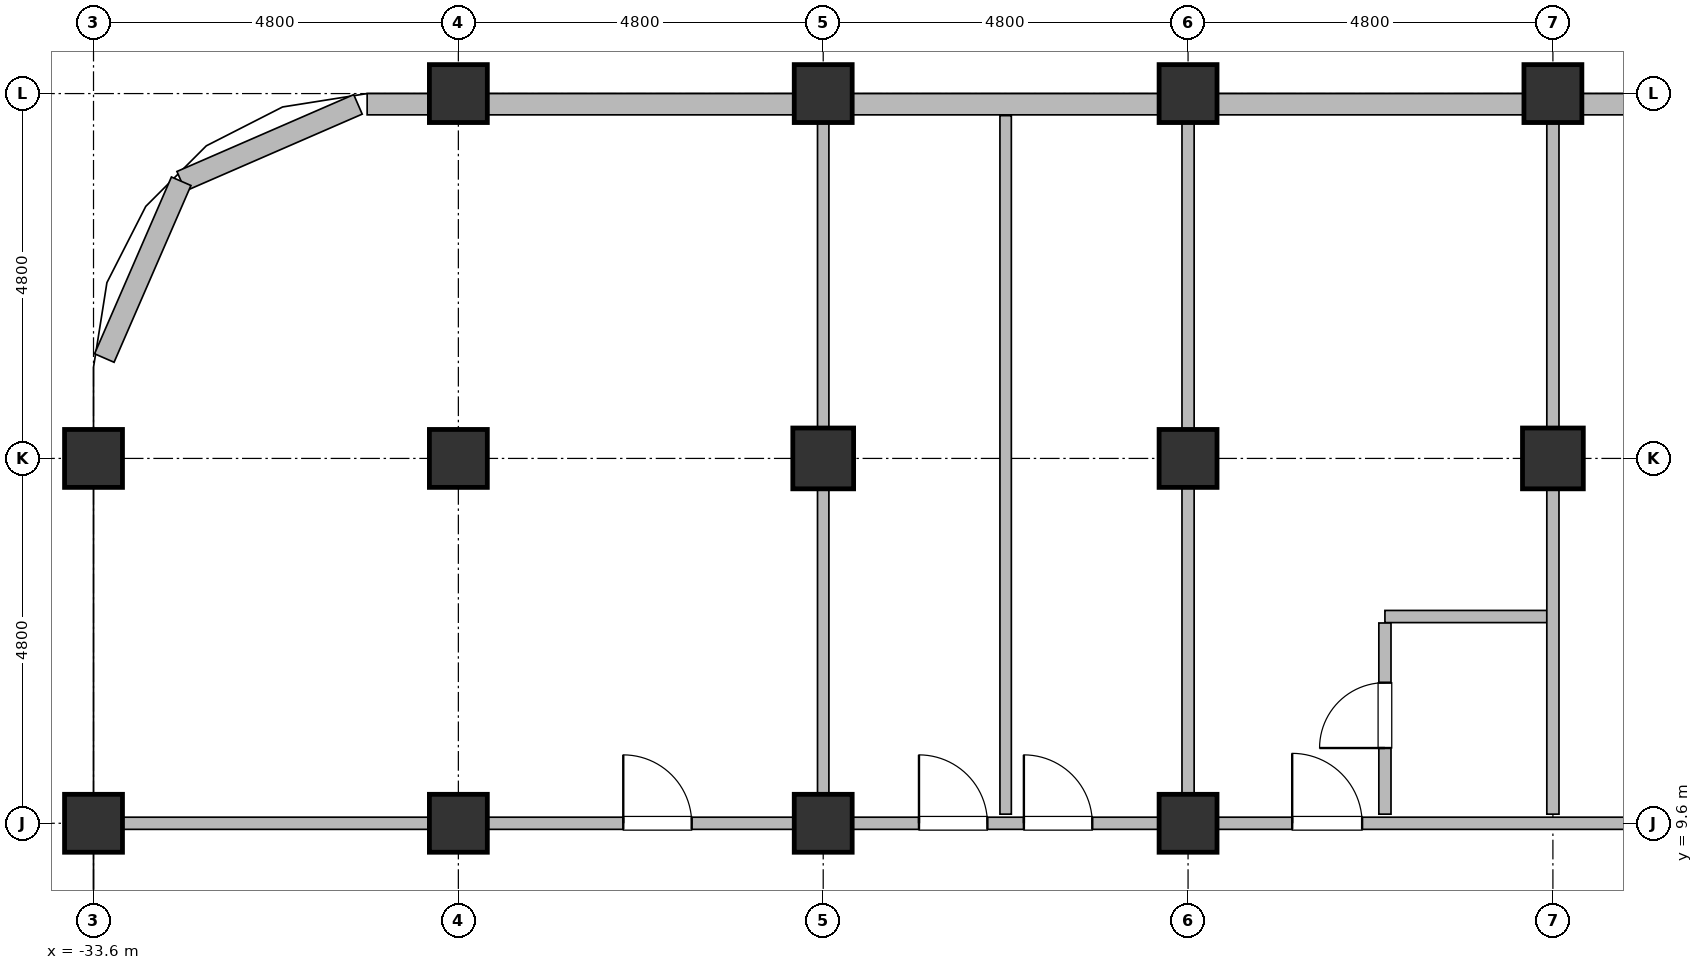
"""IFC4 building model, lengths in metres.
Left out: names, types, materials, properties, quantities, classifications, styles, units other than length and angle.
Written with IfcOpenShell. Run it as: python <this file> out.ifc"""

import sys

from ifc_helpers import new_model, si_unit, direction, frame, frame_2d, origin, origin_2d, place, context, subcontext, project, spatial, rectangle, hollow_rectangle, hollow_circle, extrude, element, fill, save


model = new_model("IFC4")
c1 = context("Model", 3, precision=1e-05, world=origin(), true_north=direction((0.0, 1.0)))
c2 = subcontext(c1, "Body", "Model", "MODEL_VIEW")
j1 = project(units=[si_unit("LENGTHUNIT", "METRE"), si_unit("PLANEANGLEUNIT", "RADIAN")], contexts=[c1])
p1 = place(None, origin())
s1 = spatial("IfcSite", under=j1, at=p1, CompositionType="ELEMENT")
p2 = place(p1, origin())
s2 = spatial("IfcBuilding", under=s1, at=p2, CompositionType="ELEMENT")
p3 = place(p2, frame((0.0, 0.0, 48.5)))
s3 = spatial("IfcBuildingStorey", under=s2, at=p3, CompositionType="ELEMENT", Elevation=48.5)
for number, where, z_axis, x_axis in (
    (1, (-33.6, 9.6, 0.0), (0.0, 0.0, 1.0), (1.0, 0.0, 0.0)),
    (2, (-33.6, 14.4, 0.0), (0.0, 0.0, 1.0), (1.0, 0.0, 0.0)),
    (3, (-28.8, 9.6, 0.0), (0.0, 0.0, 1.0), (1.0, 0.0, 0.0)),
    (4, (-28.8, 14.4, 0.0), (0.0, 0.0, 1.0), (1.0, 0.0, 0.0)),
    (5, (-28.8, 19.2, 0.0), (0.0, 0.0, 1.0), (1.0, 0.0, 0.0)),
    (6, (-24.0, 9.6, 0.0), (0.0, 0.0, 1.0), (1.0, 0.0, 0.0)),
):
    element("IfcColumn", number, at=place(p3, frame(where, z_axis=z_axis, x_axis=x_axis)), inside=s3, PredefinedType="COLUMN", context=c2, shape_type="SweptSolid", body=[
        extrude(hollow_circle(Radius=0.381, WallThickness=0.032, at=origin_2d()), origin(), (0.0, 0.0, 1.0), 3.7),
    ])
p4 = place(p3, frame((-24.0, 14.4, 0.0), z_axis=(0.0, 0.0, 1.0), x_axis=(1.0, 0.0, 0.0)))
e7 = element("IfcColumn", 7, at=p4, inside=s3, PredefinedType="COLUMN", context=c2, shape_type="SweptSolid", body=[
    extrude(hollow_rectangle(XDim=0.8, YDim=0.8, WallThickness=0.036, at=origin_2d()), origin(), (0.0, 0.0, 1.0), 3.7),
])
for number, where, z_axis, x_axis in (
    (8, (-24.0, 19.2, 0.0), (0.0, 0.0, 1.0), (1.0, 0.0, 0.0)),
    (9, (-19.2, 9.6, 0.0), (0.0, 0.0, 1.0), (1.0, 0.0, 0.0)),
    (10, (-19.2, 14.4, 0.0), (0.0, 0.0, 1.0), (1.0, 0.0, 0.0)),
    (11, (-19.2, 19.2, 0.0), (0.0, 0.0, 1.0), (1.0, 0.0, 0.0)),
):
    element("IfcColumn", number, at=place(p3, frame(where, z_axis=z_axis, x_axis=x_axis)), inside=s3, PredefinedType="COLUMN", context=c2, shape_type="SweptSolid", body=[
        extrude(hollow_circle(Radius=0.381, WallThickness=0.032, at=origin_2d()), origin(), (0.0, 0.0, 1.0), 3.7),
    ])
p5 = place(p3, frame((-14.4, 14.4, 0.0), z_axis=(0.0, 0.0, 1.0), x_axis=(1.0, 0.0, 0.0)))
e12 = element("IfcColumn", 12, at=p5, inside=s3, PredefinedType="COLUMN", context=c2, shape_type="SweptSolid", body=[
    extrude(hollow_rectangle(XDim=0.8, YDim=0.8, WallThickness=0.036, at=origin_2d()), origin(), (0.0, 0.0, 1.0), 3.7),
])
p6 = place(p3, frame((-14.4, 19.2, 0.0), z_axis=(0.0, 0.0, 1.0), x_axis=(1.0, 0.0, 0.0)))
e13 = element("IfcColumn", 13, at=p6, inside=s3, PredefinedType="COLUMN", context=c2, shape_type="SweptSolid", body=[
    extrude(hollow_circle(Radius=0.381, WallThickness=0.032, at=origin_2d()), origin(), (0.0, 0.0, 1.0), 3.7),
])
p7 = place(p3, frame((-30.121, 19.058, 0.0), z_axis=(0.0, 0.0, 1.0), x_axis=(-0.917060872934, -0.398747232384, 0.0)))
e14 = element("IfcWall", 14, at=p7, inside=s3, PredefinedType="SOLIDWALL", context=c2, shape_type="SweptSolid", body=[
    extrude(rectangle(XDim=2.536, YDim=0.28, at=frame_2d((1.268, 0.0))), origin(), (0.0, 0.0, 1.0), 2.12),
])
p8 = place(p3, frame((-32.447, 18.047, 0.0), z_axis=(0.0, 0.0, 1.0), x_axis=(-0.398792985289, -0.917040977756, 0.0)))
e15 = element("IfcWall", 15, at=p8, inside=s3, PredefinedType="SOLIDWALL", context=c2, shape_type="SweptSolid", body=[
    extrude(rectangle(XDim=2.536, YDim=0.28, at=frame_2d((1.268, 0.0))), origin(), (0.0, 0.0, 1.0), 2.12),
])
p9 = place(p3, frame((-30.0, 19.06, 0.0), z_axis=(0.0, 0.0, 1.0), x_axis=(1.0, 0.0, 0.0)))
e16 = element("IfcWall", 16, at=p9, inside=s3, PredefinedType="SOLIDWALL", context=c2, shape_type="SweptSolid", body=[
    extrude(rectangle(XDim=25.25, YDim=0.28, at=frame_2d((12.625, 0.0))), origin(), (0.0, 0.0, 1.0), 2.12),
])
p10 = place(p9, frame((9.0, 0.0, 0.75)))
e17 = element("IfcOpeningElement", 17, at=p10, cuts=e16, PredefinedType="OPENING", context=c2, shape_type="SweptSolid", body=[
    extrude(rectangle(XDim=1.2, YDim=1.15, at=frame_2d((0.6, 0.575))), frame((0.0, 0.155, 0.0), z_axis=(0.0, -1.0, 0.0), x_axis=(1.0, 0.0, 0.0)), (0.0, 0.0, 1.0), 0.31),
])
p11 = place(p9, frame((12.3, 0.0, 0.75)))
e18 = element("IfcOpeningElement", 18, at=p11, cuts=e16, PredefinedType="OPENING", context=c2, shape_type="SweptSolid", body=[
    extrude(rectangle(XDim=1.8, YDim=1.15, at=frame_2d((0.9, 0.575))), frame((0.0, 0.155, 0.0), z_axis=(0.0, -1.0, 0.0), x_axis=(1.0, 0.0, 0.0)), (0.0, 0.0, 1.0), 0.31),
])
p12 = place(p3, frame((-33.43, 9.6, 0.0), z_axis=(0.0, 0.0, 1.0), x_axis=(1.0, 0.0, 0.0)))
e19 = element("IfcWall", 19, at=p12, inside=s3, PredefinedType="PARTITIONING", context=c2, shape_type="SweptSolid", body=[
    extrude(rectangle(XDim=62.06, YDim=0.16, at=frame_2d((31.03, 0.0))), origin(), (0.0, 0.0, 1.0), 2.62),
])
p13 = place(p12, frame((6.8, 0.0, 0.0)))
e20 = element("IfcOpeningElement", 20, at=p13, cuts=e19, PredefinedType="OPENING", context=c2, shape_type="SweptSolid", body=[
    extrude(rectangle(XDim=0.9, YDim=2.1, at=frame_2d((0.45, 1.05))), frame((0.0, 0.095, 0.0), z_axis=(0.0, -1.0, 0.0), x_axis=(1.0, 0.0, 0.0)), (0.0, 0.0, 1.0), 0.19),
])
p14 = place(p12, frame((54.361, 0.0, 0.0)))
e21 = element("IfcOpeningElement", 21, at=p14, cuts=e19, PredefinedType="OPENING", context=c2, shape_type="SweptSolid", body=[
    extrude(rectangle(XDim=0.9, YDim=2.1, at=frame_2d((0.45, 1.05))), frame((0.0, 0.095, 0.0), z_axis=(0.0, -1.0, 0.0), x_axis=(1.0, 0.0, 0.0)), (0.0, 0.0, 1.0), 0.19),
])
p15 = place(p12, frame((10.69, 0.0, 0.0)))
e22 = element("IfcOpeningElement", 22, at=p15, cuts=e19, PredefinedType="OPENING", context=c2, shape_type="SweptSolid", body=[
    extrude(rectangle(XDim=0.9, YDim=2.1, at=frame_2d((0.45, 1.05))), frame((0.0, 0.095, 0.0), z_axis=(0.0, -1.0, 0.0), x_axis=(1.0, 0.0, 0.0)), (0.0, 0.0, 1.0), 0.19),
])
p16 = place(p12, frame((12.07, 0.0, 0.0)))
e23 = element("IfcOpeningElement", 23, at=p16, cuts=e19, PredefinedType="OPENING", context=c2, shape_type="SweptSolid", body=[
    extrude(rectangle(XDim=0.9, YDim=2.1, at=frame_2d((0.45, 1.05))), frame((0.0, 0.095, 0.0), z_axis=(0.0, -1.0, 0.0), x_axis=(1.0, 0.0, 0.0)), (0.0, 0.0, 1.0), 0.19),
])
p17 = place(p12, frame((15.6, 0.0, 0.0)))
e24 = element("IfcOpeningElement", 24, at=p17, cuts=e19, PredefinedType="OPENING", context=c2, shape_type="SweptSolid", body=[
    extrude(rectangle(XDim=0.92, YDim=2.15, at=frame_2d((0.46, 1.075))), frame((0.0, 0.095, 0.0), z_axis=(0.0, -1.0, 0.0), x_axis=(1.0, 0.0, 0.0)), (0.0, 0.0, 1.0), 0.19),
])
p18 = place(p12, frame((20.98, 0.0, 0.0)))
e25 = element("IfcOpeningElement", 25, at=p18, cuts=e19, PredefinedType="OPENING", context=c2, shape_type="SweptSolid", body=[
    extrude(rectangle(XDim=0.9, YDim=2.1, at=frame_2d((0.45, 1.05))), frame((0.0, 0.095, 0.0), z_axis=(0.0, -1.0, 0.0), x_axis=(1.0, 0.0, 0.0)), (0.0, 0.0, 1.0), 0.19),
])
p19 = place(p12, frame((35.38, 0.0, 0.0)))
e26 = element("IfcOpeningElement", 26, at=p19, cuts=e19, PredefinedType="OPENING", context=c2, shape_type="SweptSolid", body=[
    extrude(rectangle(XDim=0.9, YDim=2.1, at=frame_2d((0.45, 1.05))), frame((0.0, 0.095, 0.0), z_axis=(0.0, -1.0, 0.0), x_axis=(1.0, 0.0, 0.0)), (0.0, 0.0, 1.0), 0.19),
])
p20 = place(p12, frame((46.035, 0.0, 0.0)))
e27 = element("IfcOpeningElement", 27, at=p20, cuts=e19, PredefinedType="OPENING", context=c2, shape_type="SweptSolid", body=[
    extrude(rectangle(XDim=0.92, YDim=2.15, at=frame_2d((0.46, 1.075))), frame((0.0, 0.095, 0.0), z_axis=(0.0, -1.0, 0.0), x_axis=(1.0, 0.0, 0.0)), (0.0, 0.0, 1.0), 0.19),
])
p21 = place(p12, frame((48.705, 0.0, 0.0)))
e28 = element("IfcOpeningElement", 28, at=p21, cuts=e19, PredefinedType="OPENING", context=c2, shape_type="SweptSolid", body=[
    extrude(rectangle(XDim=0.92, YDim=2.15, at=frame_2d((0.46, 1.075))), frame((0.0, 0.095, 0.0), z_axis=(0.0, -1.0, 0.0), x_axis=(1.0, 0.0, 0.0)), (0.0, 0.0, 1.0), 0.19),
])
p22 = place(p3, frame((-16.61, 12.32, 0.0), z_axis=(0.0, 0.0, 1.0), x_axis=(1.0, 0.0, 0.0)))
e29 = element("IfcWall", 29, at=p22, inside=s3, PredefinedType="PARTITIONING", context=c2, shape_type="SweptSolid", body=[
    extrude(rectangle(XDim=2.13, YDim=0.16, at=frame_2d((1.065, 0.0))), origin(), (0.0, 0.0, 1.0), 2.82),
])
for number, where, z_axis, x_axis in (
    (30, (-24.0, 9.72, 0.0), (0.0, 0.0, 1.0), (0.0, 1.0, 0.0)),
    (31, (-21.6, 9.72, 0.0), (0.0, 0.0, 1.0), (0.0, 1.0, 0.0)),
):
    element("IfcWall", number, at=place(p3, frame(where, z_axis=z_axis, x_axis=x_axis)), inside=s3, PredefinedType="PARTITIONING", context=c2, shape_type="SweptSolid", body=[
        extrude(rectangle(XDim=9.19, YDim=0.15, at=frame_2d((4.595, 0.0))), origin(), (0.0, 0.0, 1.0), 2.62),
    ])
p23 = place(p3, frame((-19.2, 9.72, 0.0), z_axis=(0.0, 0.0, 1.0), x_axis=(0.0, 1.0, 0.0)))
e32 = element("IfcWall", 32, at=p23, inside=s3, PredefinedType="PARTITIONING", context=c2, shape_type="SweptSolid", body=[
    extrude(rectangle(XDim=9.19, YDim=0.16, at=frame_2d((4.595, 0.0))), origin(), (0.0, 0.0, 1.0), 2.62),
])
p24 = place(p3, frame((-16.61, 9.72, 0.0), z_axis=(0.0, 0.0, 1.0), x_axis=(0.0, 1.0, 0.0)))
e33 = element("IfcWall", 33, at=p24, inside=s3, PredefinedType="PARTITIONING", context=c2, shape_type="SweptSolid", body=[
    extrude(rectangle(XDim=2.515, YDim=0.16, at=frame_2d((1.258, 0.0))), origin(), (0.0, 0.0, 1.0), 2.62),
])
p25 = place(p24, frame((0.87, 0.0, 0.0)))
e34 = element("IfcOpeningElement", 34, at=p25, cuts=e33, PredefinedType="OPENING", context=c2, shape_type="SweptSolid", body=[
    extrude(rectangle(XDim=0.86, YDim=2.1, at=frame_2d((0.43, 1.05))), frame((0.0, 0.095, 0.0), z_axis=(0.0, -1.0, 0.0), x_axis=(1.0, 0.0, 0.0)), (0.0, 0.0, 1.0), 0.19),
])
p26 = place(p3, frame((-14.4, 9.72, 0.0), z_axis=(0.0, 0.0, 1.0), x_axis=(0.0, 1.0, 0.0)))
e35 = element("IfcWall", 35, at=p26, inside=s3, PredefinedType="PARTITIONING", context=c2, shape_type="SweptSolid", body=[
    extrude(rectangle(XDim=9.19, YDim=0.16, at=frame_2d((4.595, 0.0))), origin(), (0.0, 0.0, 1.0), 2.62),
])
p27 = place(p10, origin())
e36 = element("IfcWindow", 36, at=p27, inside=s3, PartitioningType="SINGLE_PANEL", PredefinedType="WINDOW", context=c2, shape_type="SweptSolid", body=[
    extrude(rectangle(XDim=1.2, YDim=1.15, at=frame_2d((0.6, 0.575))), frame((0.0, 0.03, 0.0), z_axis=(0.0, -1.0, 0.0), x_axis=(1.0, 0.0, 0.0)), (0.0, 0.0, 1.0), 0.06),
])
fill(e17, e36)
p28 = place(p11, origin())
e37 = element("IfcWindow", 37, at=p28, inside=s3, PartitioningType="SINGLE_PANEL", PredefinedType="WINDOW", context=c2, shape_type="SweptSolid", body=[
    extrude(rectangle(XDim=1.8, YDim=1.15, at=frame_2d((0.9, 0.575))), frame((0.0, 0.03, 0.0), z_axis=(0.0, -1.0, 0.0), x_axis=(1.0, 0.0, 0.0)), (0.0, 0.0, 1.0), 0.06),
])
fill(e18, e37)
p29 = place(p13, origin())
e38 = element("IfcDoor", 38, at=p29, inside=s3, OperationType="SINGLE_SWING_RIGHT", PredefinedType="DOOR", context=c2, shape_type="SweptSolid", body=[
    extrude(rectangle(XDim=0.9, YDim=2.1, at=frame_2d((0.45, 1.05))), frame((0.0, 0.025, 0.0), z_axis=(0.0, -1.0, 0.0), x_axis=(1.0, 0.0, 0.0)), (0.0, 0.0, 1.0), 0.05),
])
fill(e20, e38)
p30 = place(p15, origin())
e39 = element("IfcDoor", 39, at=p30, inside=s3, OperationType="SINGLE_SWING_LEFT", PredefinedType="DOOR", context=c2, shape_type="SweptSolid", body=[
    extrude(rectangle(XDim=0.9, YDim=2.1, at=frame_2d((0.45, 1.05))), frame((0.0, 0.025, 0.0), z_axis=(0.0, -1.0, 0.0), x_axis=(1.0, 0.0, 0.0)), (0.0, 0.0, 1.0), 0.05),
])
fill(e22, e39)
p31 = place(p16, origin())
e40 = element("IfcDoor", 40, at=p31, inside=s3, OperationType="SINGLE_SWING_LEFT", PredefinedType="DOOR", context=c2, shape_type="SweptSolid", body=[
    extrude(rectangle(XDim=0.9, YDim=2.1, at=frame_2d((0.45, 1.05))), frame((0.0, 0.025, 0.0), z_axis=(0.0, -1.0, 0.0), x_axis=(1.0, 0.0, 0.0)), (0.0, 0.0, 1.0), 0.05),
])
fill(e23, e40)
p32 = place(p17, origin())
e41 = element("IfcDoor", 41, at=p32, inside=s3, OperationType="SINGLE_SWING_RIGHT", PredefinedType="DOOR", context=c2, shape_type="SweptSolid", body=[
    extrude(rectangle(XDim=0.92, YDim=2.15, at=frame_2d((0.46, 1.075))), frame((0.0, 0.025, 0.0), z_axis=(0.0, -1.0, 0.0), x_axis=(1.0, 0.0, 0.0)), (0.0, 0.0, 1.0), 0.05),
])
fill(e24, e41)
p33 = place(p25, origin())
e42 = element("IfcDoor", 42, at=p33, inside=s3, OperationType="SINGLE_SWING_RIGHT", PredefinedType="DOOR", context=c2, shape_type="SweptSolid", body=[
    extrude(rectangle(XDim=0.86, YDim=2.1, at=frame_2d((0.43, 1.05))), frame((0.0, 0.025, 0.0), z_axis=(0.0, -1.0, 0.0), x_axis=(1.0, 0.0, 0.0)), (0.0, 0.0, 1.0), 0.05),
])
fill(e34, e42)
save(model, sys.argv[1])
